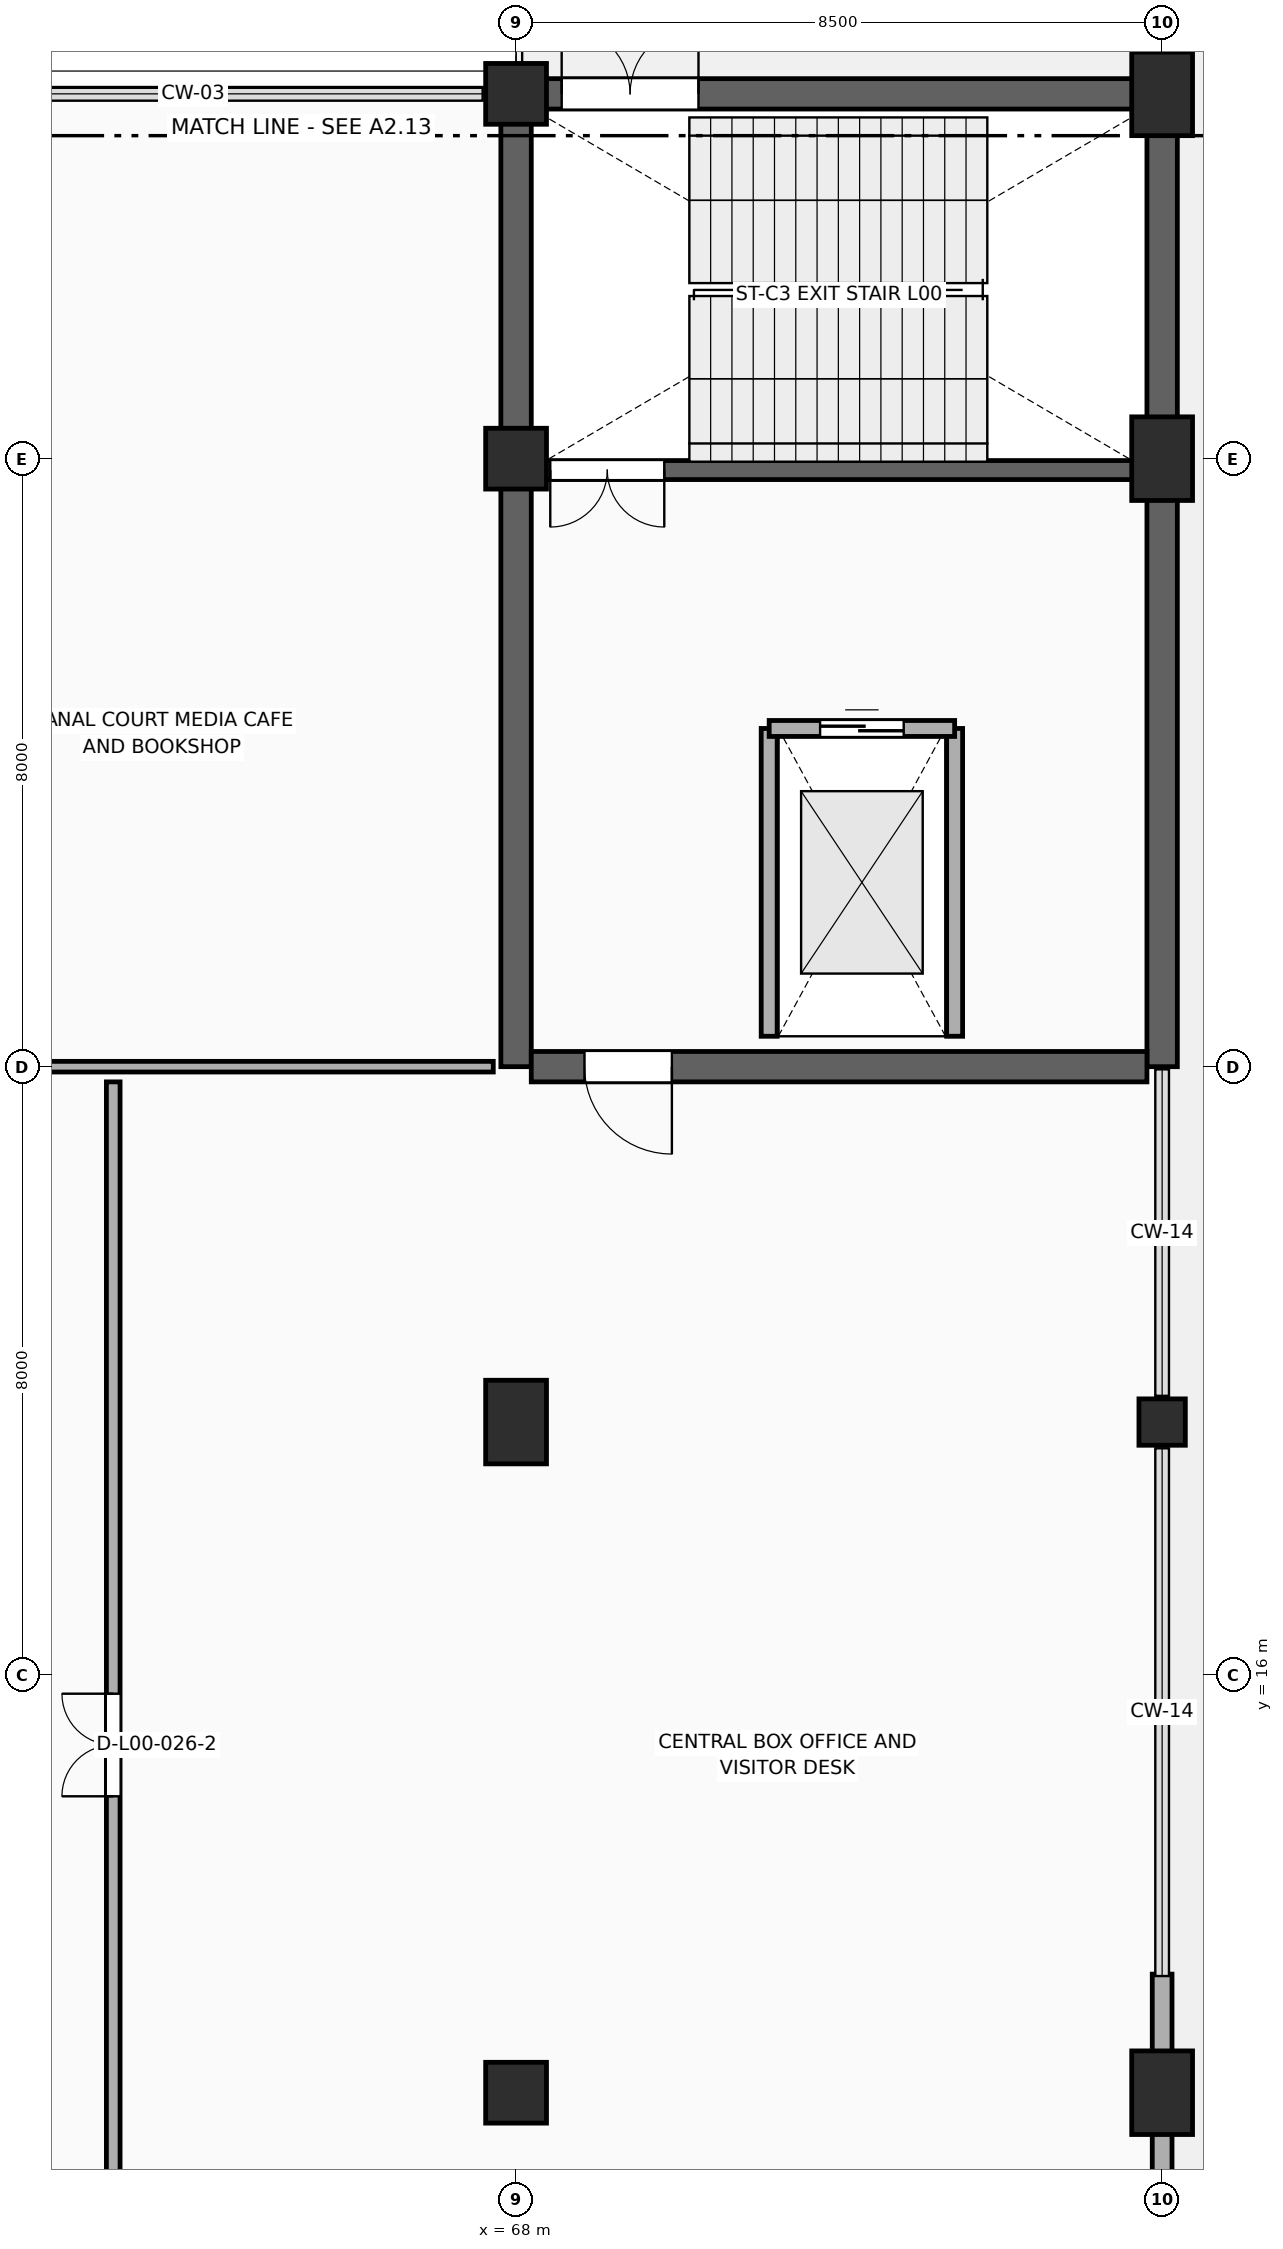
"""IFC4 building model, lengths in metres.
Left out: names, types, materials, properties, quantities, classifications, styles, units other than length and angle.
Written with IfcOpenShell. Run it as: python <this file> out.ifc"""

import sys

from ifc_helpers import new_model, si_unit, direction, frame, frame_2d, origin, origin_2d, place, context, subcontext, project, spatial, rectangle, hollow_circle, extrude, element, fill, save


model = new_model("IFC4")
c1 = context("Model", 3, precision=1e-05, world=origin(), true_north=direction((0.0, 1.0)))
c2 = subcontext(c1, "Body", "Model", "MODEL_VIEW")
j1 = project(units=[si_unit("LENGTHUNIT", "METRE"), si_unit("PLANEANGLEUNIT", "RADIAN")], contexts=[c1])
p1 = place(None, origin())
s1 = spatial("IfcSite", under=j1, at=p1, CompositionType="ELEMENT")
p2 = place(p1, origin())
s2 = spatial("IfcBuilding", under=s1, at=p2, CompositionType="ELEMENT")
p3 = place(p2, origin())
s3 = spatial("IfcBuildingStorey", under=s2, at=p3, CompositionType="ELEMENT", Elevation=0.0)
for number, where, z_axis, x_axis in (
    (1, (68.0, 24.0, 0.0), (0.0, 0.0, 1.0), (0.0, 1.0, 0.0)),
    (2, (76.5, 24.0, 0.0), (0.0, 0.0, 1.0), (0.0, 1.0, 0.0)),
):
    element("IfcWall", number, at=place(p3, frame(where, z_axis=z_axis, x_axis=x_axis)), inside=s3, PredefinedType="SHEAR", context=c2, shape_type="SweptSolid", body=[
        extrude(rectangle(XDim=12.8, YDim=0.4, at=frame_2d((6.4, 0.0))), origin(), (0.0, 0.0, 1.0), 5.24),
    ])
p4 = place(p3, frame((68.2, 36.8, 0.0), z_axis=(0.0, 0.0, 1.0), x_axis=(1.0, 0.0, 0.0)))
e3 = element("IfcWall", 3, at=p4, inside=s3, PredefinedType="SHEAR", context=c2, shape_type="SweptSolid", body=[
    extrude(rectangle(XDim=8.1, YDim=0.4, at=frame_2d((4.05, 0.0))), origin(), (0.0, 0.0, 1.0), 5.24),
])
p5 = place(p4, frame((0.4, 0.0, 0.0)))
e4 = element("IfcOpeningElement", 4, at=p5, cuts=e3, PredefinedType="OPENING", context=c2, shape_type="SweptSolid", body=[
    extrude(rectangle(XDim=1.8, YDim=2.3, at=frame_2d((0.9, 1.15))), frame((0.0, 0.212, 0.0), z_axis=(0.0, -1.0, 0.0), x_axis=(1.0, 0.0, 0.0)), (0.0, 0.0, 1.0), 0.424),
])
p6 = place(p3, frame((68.2, 24.0, 0.0), z_axis=(0.0, 0.0, 1.0), x_axis=(1.0, 0.0, 0.0)))
e5 = element("IfcWall", 5, at=p6, inside=s3, PredefinedType="SHEAR", context=c2, shape_type="SweptSolid", body=[
    extrude(rectangle(XDim=8.1, YDim=0.4, at=frame_2d((4.05, 0.0))), origin(), (0.0, 0.0, 1.0), 5.24),
])
p7 = place(p6, frame((0.7, 0.0, 0.0)))
e6 = element("IfcOpeningElement", 6, at=p7, cuts=e5, PredefinedType="OPENING", context=c2, shape_type="SweptSolid", body=[
    extrude(rectangle(XDim=1.15, YDim=2.2, at=frame_2d((0.575, 1.1))), frame((0.0, 0.212, 0.0), z_axis=(0.0, -1.0, 0.0), x_axis=(1.0, 0.0, 0.0)), (0.0, 0.0, 1.0), 0.424),
])
p8 = place(p3, frame((68.25, 31.85, 0.0), z_axis=(0.0, 0.0, 1.0), x_axis=(1.0, 0.0, 0.0)))
e7 = element("IfcWall", 7, at=p8, inside=s3, PredefinedType="STANDARD", context=c2, shape_type="SweptSolid", body=[
    extrude(rectangle(XDim=8.0, YDim=0.25, at=frame_2d((4.0, 0.0))), origin(), (0.0, 0.0, 1.0), 5.24),
])
p9 = place(p8, frame((0.2, 0.0, 0.0)))
e8 = element("IfcOpeningElement", 8, at=p9, cuts=e7, PredefinedType="OPENING", context=c2, shape_type="SweptSolid", body=[
    extrude(rectangle(XDim=1.5, YDim=2.2, at=frame_2d((0.75, 1.1))), frame((0.0, 0.137, 0.0), z_axis=(0.0, -1.0, 0.0), x_axis=(1.0, 0.0, 0.0)), (0.0, 0.0, 1.0), 0.274),
])
for number, where, z_axis, x_axis in (
    (9, (71.33, 24.4, 0.0), (0.0, 0.0, 1.0), (0.0, 1.0, 0.0)),
    (10, (73.77, 24.4, 0.0), (0.0, 0.0, 1.0), (0.0, 1.0, 0.0)),
):
    element("IfcWall", number, at=place(p3, frame(where, z_axis=z_axis, x_axis=x_axis)), inside=s3, PredefinedType="PARTITIONING", context=c2, shape_type="SweptSolid", body=[
        extrude(rectangle(XDim=4.05, YDim=0.21, at=frame_2d((2.025, 0.0))), origin(), (0.0, 0.0, 1.0), 5.24),
    ])
p10 = place(p3, frame((71.33, 28.45, 0.0), z_axis=(0.0, 0.0, 1.0), x_axis=(1.0, 0.0, 0.0)))
e11 = element("IfcWall", 11, at=p10, inside=s3, PredefinedType="PARTITIONING", context=c2, shape_type="SweptSolid", body=[
    extrude(rectangle(XDim=2.44, YDim=0.21, at=frame_2d((1.22, 0.0))), origin(), (0.0, 0.0, 1.0), 5.24),
])
p11 = place(p10, frame((0.67, 0.0, 0.0)))
e12 = element("IfcOpeningElement", 12, at=p11, cuts=e11, PredefinedType="OPENING", context=c2, shape_type="SweptSolid", body=[
    extrude(rectangle(XDim=1.1, YDim=2.2, at=frame_2d((0.55, 1.1))), frame((0.0, 0.117, 0.0), z_axis=(0.0, -1.0, 0.0), x_axis=(1.0, 0.0, 0.0)), (0.0, 0.0, 1.0), 0.234),
])
for number, where, z_axis, x_axis in (
    (13, (68.0, 10.5, 0.0), (0.0, 0.0, 1.0), (1.0, 0.0, 0.0)),
    (14, (68.0, 32.0, 0.0), (0.0, 0.0, 1.0), (1.0, 0.0, 0.0)),
    (15, (68.0, 36.8, 0.0), (0.0, 0.0, 1.0), (1.0, 0.0, 0.0)),
):
    element("IfcColumn", number, at=place(p3, frame(where, z_axis=z_axis, x_axis=x_axis)), inside=s3, PredefinedType="COLUMN", context=c2, shape_type="SweptSolid", body=[
        extrude(rectangle(XDim=0.8, YDim=0.8, at=origin_2d()), origin(), (0.0, 0.0, 1.0), 5.14),
    ])
for number, where, z_axis, x_axis in (
    (16, (76.5, 10.5, 0.0), (0.0, 0.0, 1.0), (1.0, 0.0, 0.0)),
    (17, (76.5, 32.0, 0.0), (0.0, 0.0, 1.0), (1.0, 0.0, 0.0)),
    (18, (76.5, 36.8, 0.0), (0.0, 0.0, 1.0), (1.0, 0.0, 0.0)),
    (19, (68.0, 19.324, 0.0), (0.0, 0.0, 1.0), (1.0, 0.0, 0.0)),
):
    element("IfcColumn", number, at=place(p3, frame(where, z_axis=z_axis, x_axis=x_axis)), inside=s3, PredefinedType="COLUMN", context=c2, shape_type="SweptSolid", body=[
        extrude(rectangle(XDim=0.8, YDim=1.1, at=origin_2d()), origin(), (0.0, 0.0, 1.0), 5.14),
    ])
p12 = place(p3, frame((76.5, 19.324, 0.0), z_axis=(0.0, 0.0, 1.0), x_axis=(1.0, 0.0, 0.0)))
e20 = element("IfcColumn", 20, at=p12, inside=s3, PredefinedType="COLUMN", context=c2, shape_type="SweptSolid", body=[
    extrude(hollow_circle(Radius=0.305, WallThickness=0.02, at=origin_2d()), origin(), (0.0, 0.0, 1.0), 5.14),
])
p13 = place(p3, frame((76.5, 0.0, 0.0), z_axis=(0.0, 0.0, 1.0), x_axis=(0.0, 1.0, 0.0)))
e21 = element("IfcWall", 21, at=p13, inside=s3, PredefinedType="STANDARD", context=c2, shape_type="SweptSolid", body=[
    extrude(rectangle(XDim=12.06, YDim=0.26, at=frame_2d((6.03, 0.0))), origin(), (0.0, 0.0, 1.0), 4.28),
])
p14 = place(p13, frame((7.2, 0.0, 0.0)))
e22 = element("IfcOpeningElement", 22, at=p14, cuts=e21, PredefinedType="OPENING", context=c2, shape_type="SweptSolid", body=[
    extrude(rectangle(XDim=2.2, YDim=2.5, at=frame_2d((1.1, 1.25))), frame((0.0, 0.142, 0.0), z_axis=(0.0, -1.0, 0.0), x_axis=(1.0, 0.0, 0.0)), (0.0, 0.0, 1.0), 0.284),
])
p15 = place(p13, frame((2.215, 0.0, 1.1)))
e23 = element("IfcOpeningElement", 23, at=p15, cuts=e21, PredefinedType="OPENING", context=c2, shape_type="SweptSolid", body=[
    extrude(rectangle(XDim=1.6, YDim=2.2, at=frame_2d((0.8, 1.1))), frame((0.0, 0.142, 0.0), z_axis=(0.0, -1.0, 0.0), x_axis=(1.0, 0.0, 0.0)), (0.0, 0.0, 1.0), 0.284),
])
p16 = place(p3, frame((62.7, 0.4, 0.0), z_axis=(0.0, 0.0, 1.0), x_axis=(0.0, 1.0, 0.0)))
e24 = element("IfcWall", 24, at=p16, inside=s3, PredefinedType="PARTITIONING", context=c2, shape_type="SweptSolid", body=[
    extrude(rectangle(XDim=23.4, YDim=0.18, at=frame_2d((11.7, 0.0))), origin(), (0.0, 0.0, 1.0), 4.38),
])
p17 = place(p16, frame((2.2, 0.0, 0.0)))
e25 = element("IfcOpeningElement", 25, at=p17, cuts=e24, PredefinedType="OPENING", context=c2, shape_type="SweptSolid", body=[
    extrude(rectangle(XDim=1.05, YDim=2.15, at=frame_2d((0.525, 1.075))), frame((0.0, 0.102, 0.0), z_axis=(0.0, -1.0, 0.0), x_axis=(1.0, 0.0, 0.0)), (0.0, 0.0, 1.0), 0.204),
])
p18 = place(p16, frame((14.0, 0.0, 0.0)))
e26 = element("IfcOpeningElement", 26, at=p18, cuts=e24, PredefinedType="OPENING", context=c2, shape_type="SweptSolid", body=[
    extrude(rectangle(XDim=1.35, YDim=2.25, at=frame_2d((0.675, 1.125))), frame((0.0, 0.102, 0.0), z_axis=(0.0, -1.0, 0.0), x_axis=(1.0, 0.0, 0.0)), (0.0, 0.0, 1.0), 0.204),
])
p19 = place(p3, frame((42.8, 24.0, 0.0), z_axis=(0.0, 0.0, 1.0), x_axis=(1.0, 0.0, 0.0)))
e27 = element("IfcWall", 27, at=p19, inside=s3, PredefinedType="PARTITIONING", context=c2, shape_type="SweptSolid", body=[
    extrude(rectangle(XDim=24.9, YDim=0.14, at=frame_2d((12.45, 0.0))), origin(), (0.0, 0.0, 1.0), 4.18),
])
p20 = place(p19, frame((10.0, 0.0, 0.0)))
e28 = element("IfcOpeningElement", 28, at=p20, cuts=e27, PredefinedType="OPENING", context=c2, shape_type="SweptSolid", body=[
    extrude(rectangle(XDim=1.35, YDim=2.25, at=frame_2d((0.675, 1.125))), frame((0.0, 0.082, 0.0), z_axis=(0.0, -1.0, 0.0), x_axis=(1.0, 0.0, 0.0)), (0.0, 0.0, 1.0), 0.164),
])
p21 = place(p5, origin())
e29 = element("IfcDoor", 29, at=p21, inside=s3, OperationType="DOUBLE_DOOR_SINGLE_SWING", PredefinedType="DOOR", context=c2, shape_type="SweptSolid", body=[
    extrude(rectangle(XDim=1.8, YDim=2.3, at=frame_2d((0.9, 1.15))), frame((0.0, 0.025, 0.0), z_axis=(0.0, -1.0, 0.0), x_axis=(1.0, 0.0, 0.0)), (0.0, 0.0, 1.0), 0.05),
])
fill(e4, e29)
p22 = place(p9, frame((1.5, 0.0, 0.0), z_axis=(0.0, 0.0, 1.0), x_axis=(-1.0, 0.0, 0.0)))
e30 = element("IfcDoor", 30, at=p22, inside=s3, OperationType="DOUBLE_DOOR_SINGLE_SWING", PredefinedType="DOOR", context=c2, shape_type="SweptSolid", body=[
    extrude(rectangle(XDim=1.5, YDim=2.2, at=frame_2d((0.75, 1.1))), frame((0.0, 0.025, 0.0), z_axis=(0.0, -1.0, 0.0), x_axis=(1.0, 0.0, 0.0)), (0.0, 0.0, 1.0), 0.05),
])
fill(e8, e30)
p23 = place(p11, origin())
e31 = element("IfcDoor", 31, at=p23, inside=s3, OperationType="DOUBLE_DOOR_SLIDING", PredefinedType="DOOR", context=c2, shape_type="SweptSolid", body=[
    extrude(rectangle(XDim=1.1, YDim=2.2, at=frame_2d((0.55, 1.1))), frame((0.0, 0.025, 0.0), z_axis=(0.0, -1.0, 0.0), x_axis=(1.0, 0.0, 0.0)), (0.0, 0.0, 1.0), 0.05),
])
fill(e12, e31)
p24 = place(p7, frame((1.15, 0.0, 0.0), z_axis=(0.0, 0.0, 1.0), x_axis=(-1.0, 0.0, 0.0)))
e32 = element("IfcDoor", 32, at=p24, inside=s3, OperationType="SINGLE_SWING_RIGHT", PredefinedType="DOOR", context=c2, shape_type="SweptSolid", body=[
    extrude(rectangle(XDim=1.15, YDim=2.2, at=frame_2d((0.575, 1.1))), frame((0.0, 0.025, 0.0), z_axis=(0.0, -1.0, 0.0), x_axis=(1.0, 0.0, 0.0)), (0.0, 0.0, 1.0), 0.05),
])
fill(e6, e32)
p25 = place(p18, origin())
e33 = element("IfcDoor", 33, at=p25, inside=s3, OperationType="DOUBLE_DOOR_SINGLE_SWING", PredefinedType="DOOR", context=c2, shape_type="SweptSolid", body=[
    extrude(rectangle(XDim=1.35, YDim=2.25, at=frame_2d((0.675, 1.125))), frame((0.0, 0.025, 0.0), z_axis=(0.0, -1.0, 0.0), x_axis=(1.0, 0.0, 0.0)), (0.0, 0.0, 1.0), 0.05),
])
fill(e26, e33)
save(model, sys.argv[1])
